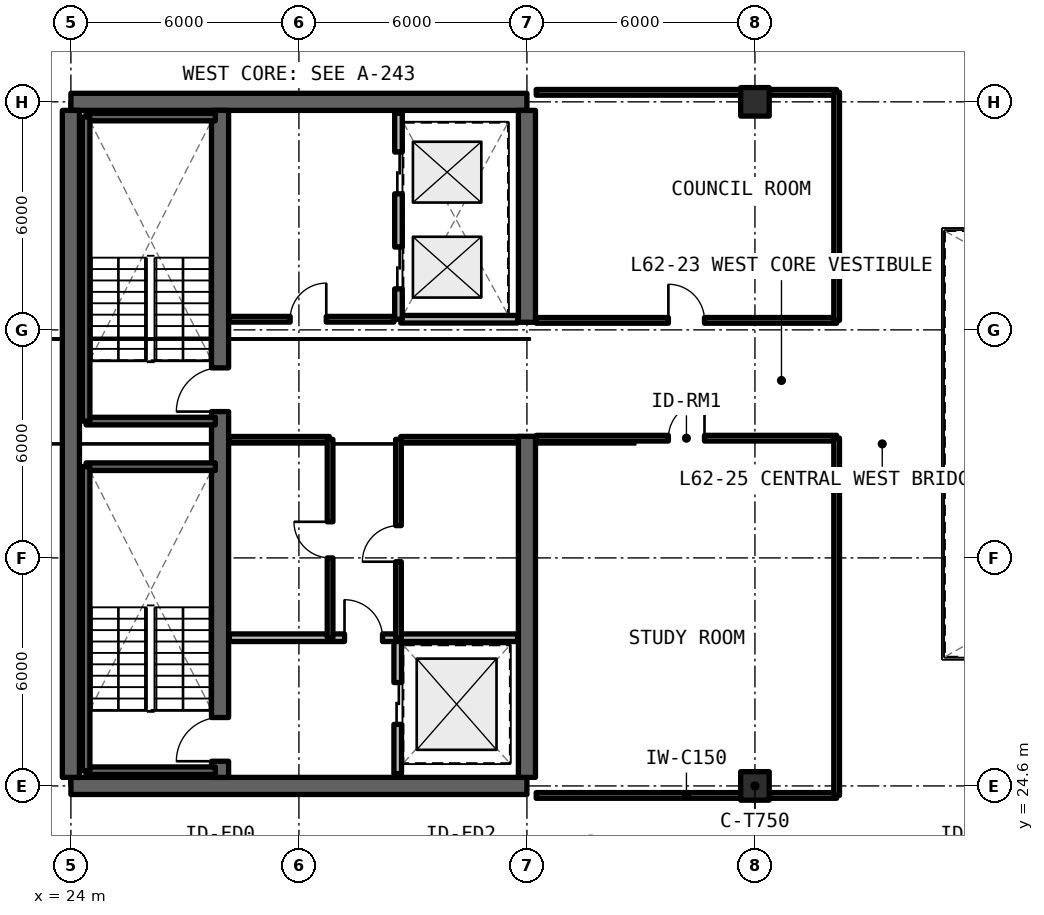
"""IFC4 building model, lengths in metres.
Left out: names, types, materials, properties, quantities, classifications, styles, units other than length and angle.
Written with IfcOpenShell. Run it as: python <this file> out.ifc"""

import sys

from ifc_helpers import new_model, si_unit, direction, frame, frame_2d, origin, origin_2d, place, context, subcontext, project, spatial, rectangle, extrude, element, fill, save


model = new_model("IFC4")
c1 = context("Model", 3, precision=1e-05, world=origin(), true_north=direction((0.0, 1.0)))
c2 = subcontext(c1, "Body", "Model", "MODEL_VIEW")
j1 = project(units=[si_unit("LENGTHUNIT", "METRE"), si_unit("PLANEANGLEUNIT", "RADIAN")], contexts=[c1])
p1 = place(None, origin())
s1 = spatial("IfcSite", under=j1, at=p1, CompositionType="ELEMENT")
p2 = place(p1, origin())
s2 = spatial("IfcBuilding", under=s1, at=p2, CompositionType="ELEMENT")
p3 = place(p2, frame((0.0, 0.0, 222.75)))
s3 = spatial("IfcBuildingStorey", under=s2, at=p3, CompositionType="ELEMENT", Elevation=222.75)
for number, where, z_axis, x_axis in (
    (1, (24.0, 24.6, 0.0), (0.0, 0.0, 1.0), (1.0, 0.0, 0.0)),
    (2, (36.0, 42.6, 0.0), (0.0, 0.0, 1.0), (-1.0, 0.0, 0.0)),
):
    element("IfcWall", number, at=place(p3, frame(where, z_axis=z_axis, x_axis=x_axis)), inside=s3, PredefinedType="SHEAR", context=c2, shape_type="SweptSolid", body=[
        extrude(rectangle(XDim=12.0, YDim=0.45, at=frame_2d((6.0, 0.0))), origin(), (0.0, 0.0, 1.0), 3.3),
    ])
p4 = place(p3, frame((24.0, 24.825, 0.0), z_axis=(0.0, 0.0, 1.0), x_axis=(0.0, 1.0, 0.0)))
e3 = element("IfcWall", 3, at=p4, inside=s3, PredefinedType="SHEAR", context=c2, shape_type="SweptSolid", body=[
    extrude(rectangle(XDim=17.55, YDim=0.45, at=frame_2d((8.775, 0.0))), origin(), (0.0, 0.0, 1.0), 3.3),
])
p5 = place(p3, frame((36.0, 24.825, 0.0), z_axis=(0.0, 0.0, 1.0), x_axis=(0.0, 1.0, 0.0)))
e4 = element("IfcWall", 4, at=p5, inside=s3, PredefinedType="SHEAR", context=c2, shape_type="SweptSolid", body=[
    extrude(rectangle(XDim=8.975, YDim=0.45, at=frame_2d((4.488, 0.0))), origin(), (0.0, 0.0, 1.0), 3.3),
])
p6 = place(p3, frame((36.0, 36.8, 0.0), z_axis=(0.0, 0.0, 1.0), x_axis=(0.0, 1.0, 0.0)))
e5 = element("IfcWall", 5, at=p6, inside=s3, PredefinedType="SHEAR", context=c2, shape_type="SweptSolid", body=[
    extrude(rectangle(XDim=5.575, YDim=0.45, at=frame_2d((2.788, 0.0))), origin(), (0.0, 0.0, 1.0), 3.3),
])
p7 = place(p3, frame((27.925, 24.825, 0.0), z_axis=(0.0, 0.0, 1.0), x_axis=(0.0, 1.0, 0.0)))
e6 = element("IfcWall", 6, at=p7, inside=s3, PredefinedType="SHEAR", context=c2, shape_type="SweptSolid", body=[
    extrude(rectangle(XDim=17.55, YDim=0.45, at=frame_2d((8.775, 0.0))), origin(), (0.0, 0.0, 1.0), 3.3),
])
p8 = place(p7, frame((0.425, 0.0, 0.0)))
e7 = element("IfcOpeningElement", 7, at=p8, cuts=e6, PredefinedType="OPENING", context=c2, shape_type="SweptSolid", body=[
    extrude(rectangle(XDim=1.15, YDim=2.15, at=frame_2d((0.575, 1.075))), frame((0.0, 0.235, 0.0), z_axis=(0.0, -1.0, 0.0), x_axis=(1.0, 0.0, 0.0)), (0.0, 0.0, 1.0), 0.47),
])
p9 = place(p7, frame((9.625, 0.0, 0.0)))
e8 = element("IfcOpeningElement", 8, at=p9, cuts=e6, PredefinedType="OPENING", context=c2, shape_type="SweptSolid", body=[
    extrude(rectangle(XDim=1.15, YDim=2.15, at=frame_2d((0.575, 1.075))), frame((0.0, 0.235, 0.0), z_axis=(0.0, -1.0, 0.0), x_axis=(1.0, 0.0, 0.0)), (0.0, 0.0, 1.0), 0.47),
])
for number, where, z_axis, x_axis in (
    (9, (42.0, 24.6, 0.0), (0.0, 0.0, 1.0), (1.0, 0.0, 0.0)),
    (10, (42.0, 42.6, 0.0), (0.0, 0.0, 1.0), (1.0, 0.0, 0.0)),
):
    element("IfcColumn", number, at=place(p3, frame(where, z_axis=z_axis, x_axis=x_axis)), inside=s3, PredefinedType="COLUMN", context=c2, shape_type="SweptSolid", body=[
        extrude(rectangle(XDim=0.75, YDim=0.75, at=origin_2d()), origin(), (0.0, 0.0, 1.0), 3.3),
    ])
p10 = place(p3, frame((32.6, 24.92, 0.0), z_axis=(0.0, 0.0, 1.0), x_axis=(0.0, 1.0, 0.0)))
e11 = element("IfcWall", 11, at=p10, inside=s3, PredefinedType="SOLIDWALL", context=c2, shape_type="SweptSolid", body=[
    extrude(rectangle(XDim=3.58, YDim=0.2, at=frame_2d((1.79, 0.0))), origin(), (0.0, 0.0, 1.0), 2.35),
])
p11 = place(p10, frame((1.3, 0.0, 0.0)))
e12 = element("IfcOpeningElement", 12, at=p11, cuts=e11, PredefinedType="OPENING", context=c2, shape_type="SweptSolid", body=[
    extrude(rectangle(XDim=1.1, YDim=2.2, at=frame_2d((0.55, 1.1))), frame((0.0, 0.11, 0.0), z_axis=(0.0, -1.0, 0.0), x_axis=(1.0, 0.0, 0.0)), (0.0, 0.0, 1.0), 0.22),
])
p12 = place(p3, frame((28.17, 28.5, 0.0), z_axis=(0.0, 0.0, 1.0), x_axis=(1.0, 0.0, 0.0)))
e13 = element("IfcWall", 13, at=p12, inside=s3, PredefinedType="SOLIDWALL", context=c2, shape_type="SweptSolid", body=[
    extrude(rectangle(XDim=7.585, YDim=0.2, at=frame_2d((3.792, 0.0))), origin(), (0.0, 0.0, 1.0), 2.35),
])
p13 = place(p12, frame((3.03, 0.0, 0.0)))
e14 = element("IfcOpeningElement", 14, at=p13, cuts=e13, PredefinedType="OPENING", context=c2, shape_type="SweptSolid", body=[
    extrude(rectangle(XDim=1.0, YDim=2.15, at=frame_2d((0.5, 1.075))), frame((0.0, 0.11, 0.0), z_axis=(0.0, -1.0, 0.0), x_axis=(1.0, 0.0, 0.0)), (0.0, 0.0, 1.0), 0.22),
])
p14 = place(p3, frame((28.17, 33.72, 0.0), z_axis=(0.0, 0.0, 1.0), x_axis=(1.0, 0.0, 0.0)))
e15 = element("IfcWall", 15, at=p14, inside=s3, PredefinedType="SOLIDWALL", context=c2, shape_type="SweptSolid", body=[
    extrude(rectangle(XDim=2.63, YDim=0.15, at=frame_2d((1.315, 0.0))), origin(), (0.0, 0.0, 1.0), 2.35),
])
p15 = place(p3, frame((30.82, 28.5, 0.0), z_axis=(0.0, 0.0, 1.0), x_axis=(0.0, 1.0, 0.0)))
e16 = element("IfcWall", 16, at=p15, inside=s3, PredefinedType="SOLIDWALL", context=c2, shape_type="SweptSolid", body=[
    extrude(rectangle(XDim=5.22, YDim=0.15, at=frame_2d((2.61, 0.0))), origin(), (0.0, 0.0, 1.0), 2.35),
])
p16 = place(p15, frame((2.1, 0.0, 0.0)))
e17 = element("IfcOpeningElement", 17, at=p16, cuts=e16, PredefinedType="OPENING", context=c2, shape_type="SweptSolid", body=[
    extrude(rectangle(XDim=0.95, YDim=2.15, at=frame_2d((0.475, 1.075))), frame((0.0, 0.085, 0.0), z_axis=(0.0, -1.0, 0.0), x_axis=(1.0, 0.0, 0.0)), (0.0, 0.0, 1.0), 0.17),
])
p17 = place(p3, frame((32.68, 33.72, 0.0), z_axis=(0.0, 0.0, 1.0), x_axis=(1.0, 0.0, 0.0)))
e18 = element("IfcWall", 18, at=p17, inside=s3, PredefinedType="SOLIDWALL", context=c2, shape_type="SweptSolid", body=[
    extrude(rectangle(XDim=3.075, YDim=0.15, at=frame_2d((1.538, 0.0))), origin(), (0.0, 0.0, 1.0), 2.35),
])
p18 = place(p3, frame((32.62, 28.5, 0.0), z_axis=(0.0, 0.0, 1.0), x_axis=(0.0, 1.0, 0.0)))
e19 = element("IfcWall", 19, at=p18, inside=s3, PredefinedType="SOLIDWALL", context=c2, shape_type="SweptSolid", body=[
    extrude(rectangle(XDim=5.22, YDim=0.15, at=frame_2d((2.61, 0.0))), origin(), (0.0, 0.0, 1.0), 2.35),
])
p19 = place(p18, frame((2.0, 0.0, 0.0)))
e20 = element("IfcOpeningElement", 20, at=p19, cuts=e19, PredefinedType="OPENING", context=c2, shape_type="SweptSolid", body=[
    extrude(rectangle(XDim=0.95, YDim=2.15, at=frame_2d((0.475, 1.075))), frame((0.0, 0.085, 0.0), z_axis=(0.0, -1.0, 0.0), x_axis=(1.0, 0.0, 0.0)), (0.0, 0.0, 1.0), 0.17),
])
p20 = place(p3, frame((28.17, 36.88, 0.0), z_axis=(0.0, 0.0, 1.0), x_axis=(1.0, 0.0, 0.0)))
e21 = element("IfcWall", 21, at=p20, inside=s3, PredefinedType="SOLIDWALL", context=c2, shape_type="SweptSolid", body=[
    extrude(rectangle(XDim=4.33, YDim=0.15, at=frame_2d((2.165, 0.0))), origin(), (0.0, 0.0, 1.0), 2.35),
])
p21 = place(p20, frame((1.6, 0.0, 0.0)))
e22 = element("IfcOpeningElement", 22, at=p21, cuts=e21, PredefinedType="OPENING", context=c2, shape_type="SweptSolid", body=[
    extrude(rectangle(XDim=0.95, YDim=2.15, at=frame_2d((0.475, 1.075))), frame((0.0, 0.085, 0.0), z_axis=(0.0, -1.0, 0.0), x_axis=(1.0, 0.0, 0.0)), (0.0, 0.0, 1.0), 0.17),
])
p22 = place(p3, frame((32.68, 36.88, 0.0), z_axis=(0.0, 0.0, 1.0), x_axis=(1.0, 0.0, 0.0)))
e23 = element("IfcWall", 23, at=p22, inside=s3, PredefinedType="SOLIDWALL", context=c2, shape_type="SweptSolid", body=[
    extrude(rectangle(XDim=3.075, YDim=0.2, at=frame_2d((1.538, 0.0))), origin(), (0.0, 0.0, 1.0), 2.35),
])
p23 = place(p3, frame((32.62, 36.88, 0.0), z_axis=(0.0, 0.0, 1.0), x_axis=(0.0, 1.0, 0.0)))
e24 = element("IfcWall", 24, at=p23, inside=s3, PredefinedType="SOLIDWALL", context=c2, shape_type="SweptSolid", body=[
    extrude(rectangle(XDim=5.42, YDim=0.2, at=frame_2d((2.71, 0.0))), origin(), (0.0, 0.0, 1.0), 2.35),
])
p24 = place(p23, frame((0.8, 0.0, 0.0)))
e25 = element("IfcOpeningElement", 25, at=p24, cuts=e24, PredefinedType="OPENING", context=c2, shape_type="SweptSolid", body=[
    extrude(rectangle(XDim=1.1, YDim=2.2, at=frame_2d((0.55, 1.1))), frame((0.0, 0.11, 0.0), z_axis=(0.0, -1.0, 0.0), x_axis=(1.0, 0.0, 0.0)), (0.0, 0.0, 1.0), 0.22),
])
p25 = place(p23, frame((3.3, 0.0, 0.0)))
e26 = element("IfcOpeningElement", 26, at=p25, cuts=e24, PredefinedType="OPENING", context=c2, shape_type="SweptSolid", body=[
    extrude(rectangle(XDim=1.1, YDim=2.2, at=frame_2d((0.55, 1.1))), frame((0.0, 0.11, 0.0), z_axis=(0.0, -1.0, 0.0), x_axis=(1.0, 0.0, 0.0)), (0.0, 0.0, 1.0), 0.22),
])
p26 = place(p3, frame((36.245, 24.35, 0.0), z_axis=(0.0, 0.0, 1.0), x_axis=(1.0, 0.0, 0.0)))
e27 = element("IfcWall", 27, at=p26, inside=s3, PredefinedType="SOLIDWALL", context=c2, shape_type="SweptSolid", body=[
    extrude(rectangle(XDim=7.905, YDim=0.15, at=frame_2d((3.952, 0.0))), origin(), (0.0, 0.0, 1.0), 2.35),
])
p27 = place(p3, frame((36.245, 33.75, 0.0), z_axis=(0.0, 0.0, 1.0), x_axis=(1.0, 0.0, 0.0)))
e28 = element("IfcWall", 28, at=p27, inside=s3, PredefinedType="SOLIDWALL", context=c2, shape_type="SweptSolid", body=[
    extrude(rectangle(XDim=7.905, YDim=0.15, at=frame_2d((3.952, 0.0))), origin(), (0.0, 0.0, 1.0), 2.35),
])
p28 = place(p27, frame((3.478, 0.0, 0.0)))
e29 = element("IfcOpeningElement", 29, at=p28, cuts=e28, PredefinedType="OPENING", context=c2, shape_type="SweptSolid", body=[
    extrude(rectangle(XDim=0.95, YDim=2.15, at=frame_2d((0.475, 1.075))), frame((0.0, 0.085, 0.0), z_axis=(0.0, -1.0, 0.0), x_axis=(1.0, 0.0, 0.0)), (0.0, 0.0, 1.0), 0.17),
])
p29 = place(p3, frame((44.15, 24.35, 0.0), z_axis=(0.0, 0.0, 1.0), x_axis=(0.0, 1.0, 0.0)))
e30 = element("IfcWall", 30, at=p29, inside=s3, PredefinedType="SOLIDWALL", context=c2, shape_type="SweptSolid", body=[
    extrude(rectangle(XDim=9.4, YDim=0.15, at=frame_2d((4.7, 0.0))), origin(), (0.0, 0.0, 1.0), 2.35),
])
p30 = place(p3, frame((36.245, 36.85, 0.0), z_axis=(0.0, 0.0, 1.0), x_axis=(1.0, 0.0, 0.0)))
e31 = element("IfcWall", 31, at=p30, inside=s3, PredefinedType="SOLIDWALL", context=c2, shape_type="SweptSolid", body=[
    extrude(rectangle(XDim=7.905, YDim=0.15, at=frame_2d((3.952, 0.0))), origin(), (0.0, 0.0, 1.0), 2.35),
])
p31 = place(p30, frame((3.478, 0.0, 0.0)))
e32 = element("IfcOpeningElement", 32, at=p31, cuts=e31, PredefinedType="OPENING", context=c2, shape_type="SweptSolid", body=[
    extrude(rectangle(XDim=0.95, YDim=2.15, at=frame_2d((0.475, 1.075))), frame((0.0, 0.085, 0.0), z_axis=(0.0, -1.0, 0.0), x_axis=(1.0, 0.0, 0.0)), (0.0, 0.0, 1.0), 0.17),
])
p32 = place(p3, frame((36.245, 42.85, 0.0), z_axis=(0.0, 0.0, 1.0), x_axis=(1.0, 0.0, 0.0)))
e33 = element("IfcWall", 33, at=p32, inside=s3, PredefinedType="SOLIDWALL", context=c2, shape_type="SweptSolid", body=[
    extrude(rectangle(XDim=7.905, YDim=0.15, at=frame_2d((3.952, 0.0))), origin(), (0.0, 0.0, 1.0), 2.35),
])
p33 = place(p3, frame((44.15, 36.85, 0.0), z_axis=(0.0, 0.0, 1.0), x_axis=(0.0, 1.0, 0.0)))
e34 = element("IfcWall", 34, at=p33, inside=s3, PredefinedType="SOLIDWALL", context=c2, shape_type="SweptSolid", body=[
    extrude(rectangle(XDim=6.0, YDim=0.15, at=frame_2d((3.0, 0.0))), origin(), (0.0, 0.0, 1.0), 2.35),
])
for number, where, z_axis, x_axis in (
    (35, (24.4, 25.0, 0.0), (0.0, 0.0, 1.0), (1.0, 0.0, 0.0)),
    (36, (27.8, 33.0, 0.0), (0.0, 0.0, 1.0), (-1.0, 0.0, 0.0)),
):
    element("IfcWall", number, at=place(p3, frame(where, z_axis=z_axis, x_axis=x_axis)), inside=s3, PredefinedType="SOLIDWALL", context=c2, shape_type="SweptSolid", body=[
        extrude(rectangle(XDim=3.4, YDim=0.2, at=frame_2d((1.7, 0.0))), origin(), (0.0, 0.0, 1.0), 3.3),
    ])
p34 = place(p3, frame((24.4, 33.0, 0.0), z_axis=(0.0, 0.0, 1.0), x_axis=(0.0, -1.0, 0.0)))
e37 = element("IfcWall", 37, at=p34, inside=s3, PredefinedType="SOLIDWALL", context=c2, shape_type="SweptSolid", body=[
    extrude(rectangle(XDim=8.0, YDim=0.2, at=frame_2d((4.0, 0.0))), origin(), (0.0, 0.0, 1.0), 3.3),
])
for number, where, z_axis, x_axis in (
    (38, (24.4, 34.2, 0.0), (0.0, 0.0, 1.0), (1.0, 0.0, 0.0)),
    (39, (27.8, 42.2, 0.0), (0.0, 0.0, 1.0), (-1.0, 0.0, 0.0)),
):
    element("IfcWall", number, at=place(p3, frame(where, z_axis=z_axis, x_axis=x_axis)), inside=s3, PredefinedType="SOLIDWALL", context=c2, shape_type="SweptSolid", body=[
        extrude(rectangle(XDim=3.4, YDim=0.2, at=frame_2d((1.7, 0.0))), origin(), (0.0, 0.0, 1.0), 3.3),
    ])
p35 = place(p3, frame((24.4, 42.2, 0.0), z_axis=(0.0, 0.0, 1.0), x_axis=(0.0, -1.0, 0.0)))
e40 = element("IfcWall", 40, at=p35, inside=s3, PredefinedType="SOLIDWALL", context=c2, shape_type="SweptSolid", body=[
    extrude(rectangle(XDim=8.0, YDim=0.2, at=frame_2d((4.0, 0.0))), origin(), (0.0, 0.0, 1.0), 3.3),
])
p36 = place(p11, origin())
e41 = element("IfcDoor", 41, at=p36, inside=s3, OperationType="SLIDING_TO_LEFT", PredefinedType="DOOR", context=c2, shape_type="SweptSolid", body=[
    extrude(rectangle(XDim=1.1, YDim=2.2, at=frame_2d((0.55, 1.1))), frame((0.0, 0.025, 0.0), z_axis=(0.0, -1.0, 0.0), x_axis=(1.0, 0.0, 0.0)), (0.0, 0.0, 1.0), 0.05),
])
fill(e12, e41)
p37 = place(p13, origin())
e42 = element("IfcDoor", 42, at=p37, inside=s3, OperationType="SINGLE_SWING_LEFT", PredefinedType="DOOR", context=c2, shape_type="SweptSolid", body=[
    extrude(rectangle(XDim=1.0, YDim=2.15, at=frame_2d((0.5, 1.075))), frame((0.0, 0.025, 0.0), z_axis=(0.0, -1.0, 0.0), x_axis=(1.0, 0.0, 0.0)), (0.0, 0.0, 1.0), 0.05),
])
fill(e14, e42)
p38 = place(p16, origin())
e43 = element("IfcDoor", 43, at=p38, inside=s3, OperationType="SINGLE_SWING_RIGHT", PredefinedType="DOOR", context=c2, shape_type="SweptSolid", body=[
    extrude(rectangle(XDim=0.95, YDim=2.15, at=frame_2d((0.475, 1.075))), frame((0.0, 0.025, 0.0), z_axis=(0.0, -1.0, 0.0), x_axis=(1.0, 0.0, 0.0)), (0.0, 0.0, 1.0), 0.05),
])
fill(e17, e43)
p39 = place(p19, origin())
e44 = element("IfcDoor", 44, at=p39, inside=s3, OperationType="SINGLE_SWING_LEFT", PredefinedType="DOOR", context=c2, shape_type="SweptSolid", body=[
    extrude(rectangle(XDim=0.95, YDim=2.15, at=frame_2d((0.475, 1.075))), frame((0.0, 0.025, 0.0), z_axis=(0.0, -1.0, 0.0), x_axis=(1.0, 0.0, 0.0)), (0.0, 0.0, 1.0), 0.05),
])
fill(e20, e44)
p40 = place(p21, origin())
e45 = element("IfcDoor", 45, at=p40, inside=s3, OperationType="SINGLE_SWING_RIGHT", PredefinedType="DOOR", context=c2, shape_type="SweptSolid", body=[
    extrude(rectangle(XDim=0.95, YDim=2.15, at=frame_2d((0.475, 1.075))), frame((0.0, 0.025, 0.0), z_axis=(0.0, -1.0, 0.0), x_axis=(1.0, 0.0, 0.0)), (0.0, 0.0, 1.0), 0.05),
])
fill(e22, e45)
p41 = place(p24, origin())
e46 = element("IfcDoor", 46, at=p41, inside=s3, OperationType="SLIDING_TO_LEFT", PredefinedType="DOOR", context=c2, shape_type="SweptSolid", body=[
    extrude(rectangle(XDim=1.1, YDim=2.2, at=frame_2d((0.55, 1.1))), frame((0.0, 0.025, 0.0), z_axis=(0.0, -1.0, 0.0), x_axis=(1.0, 0.0, 0.0)), (0.0, 0.0, 1.0), 0.05),
])
fill(e25, e46)
p42 = place(p25, origin())
e47 = element("IfcDoor", 47, at=p42, inside=s3, OperationType="SLIDING_TO_RIGHT", PredefinedType="DOOR", context=c2, shape_type="SweptSolid", body=[
    extrude(rectangle(XDim=1.1, YDim=2.2, at=frame_2d((0.55, 1.1))), frame((0.0, 0.025, 0.0), z_axis=(0.0, -1.0, 0.0), x_axis=(1.0, 0.0, 0.0)), (0.0, 0.0, 1.0), 0.05),
])
fill(e26, e47)
p43 = place(p28, origin())
e48 = element("IfcDoor", 48, at=p43, inside=s3, OperationType="SINGLE_SWING_RIGHT", PredefinedType="DOOR", context=c2, shape_type="SweptSolid", body=[
    extrude(rectangle(XDim=0.95, YDim=2.15, at=frame_2d((0.475, 1.075))), frame((0.0, 0.025, 0.0), z_axis=(0.0, -1.0, 0.0), x_axis=(1.0, 0.0, 0.0)), (0.0, 0.0, 1.0), 0.05),
])
fill(e29, e48)
p44 = place(p31, origin())
e49 = element("IfcDoor", 49, at=p44, inside=s3, OperationType="SINGLE_SWING_LEFT", PredefinedType="DOOR", context=c2, shape_type="SweptSolid", body=[
    extrude(rectangle(XDim=0.95, YDim=2.15, at=frame_2d((0.475, 1.075))), frame((0.0, 0.025, 0.0), z_axis=(0.0, -1.0, 0.0), x_axis=(1.0, 0.0, 0.0)), (0.0, 0.0, 1.0), 0.05),
])
fill(e32, e49)
p45 = place(p8, origin())
e50 = element("IfcDoor", 50, at=p45, inside=s3, OperationType="SINGLE_SWING_RIGHT", PredefinedType="DOOR", context=c2, shape_type="SweptSolid", body=[
    extrude(rectangle(XDim=1.15, YDim=2.15, at=frame_2d((0.575, 1.075))), frame((0.0, 0.025, 0.0), z_axis=(0.0, -1.0, 0.0), x_axis=(1.0, 0.0, 0.0)), (0.0, 0.0, 1.0), 0.05),
])
fill(e7, e50)
p46 = place(p9, origin())
e51 = element("IfcDoor", 51, at=p46, inside=s3, OperationType="SINGLE_SWING_LEFT", PredefinedType="DOOR", context=c2, shape_type="SweptSolid", body=[
    extrude(rectangle(XDim=1.15, YDim=2.15, at=frame_2d((0.575, 1.075))), frame((0.0, 0.025, 0.0), z_axis=(0.0, -1.0, 0.0), x_axis=(1.0, 0.0, 0.0)), (0.0, 0.0, 1.0), 0.05),
])
fill(e8, e51)
save(model, sys.argv[1])
